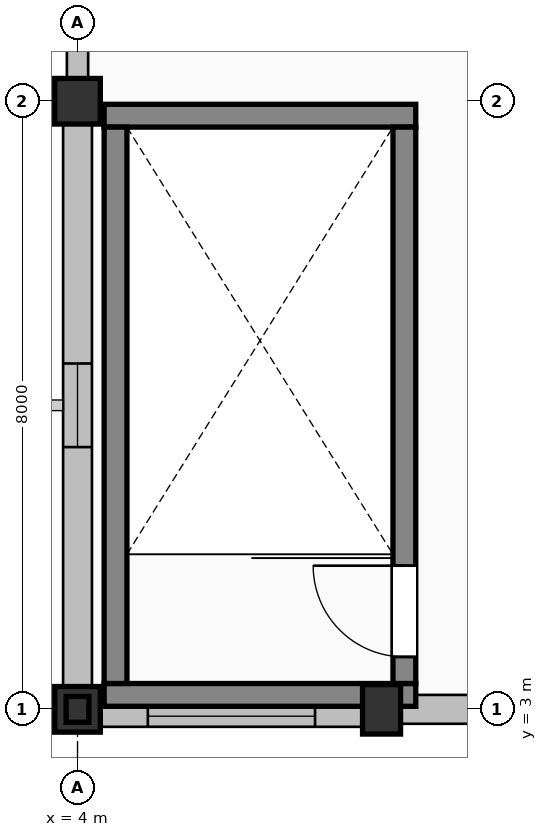
"""IFC4 building model, lengths in metres.
Left out: names, types, materials, properties, quantities, classifications, styles, units other than length and angle.
Written with IfcOpenShell. Run it as: python <this file> out.ifc"""

import sys

from ifc_helpers import new_model, si_unit, direction, frame, frame_2d, origin, origin_2d, place, context, subcontext, project, spatial, rectangle, i_section, extrude, element, fill, save


model = new_model("IFC4")
c1 = context("Model", 3, precision=1e-05, world=origin(), true_north=direction((0.0, 1.0)))
c2 = subcontext(c1, "Body", "Model", "MODEL_VIEW")
j1 = project(units=[si_unit("LENGTHUNIT", "METRE"), si_unit("PLANEANGLEUNIT", "RADIAN")], contexts=[c1])
p1 = place(None, origin())
s1 = spatial("IfcSite", under=j1, at=p1, CompositionType="ELEMENT")
p2 = place(p1, origin())
s2 = spatial("IfcBuilding", under=s1, at=p2, CompositionType="ELEMENT")
p3 = place(p2, frame((0.0, 0.0, 9.3)))
s3 = spatial("IfcBuildingStorey", under=s2, at=p3, CompositionType="ELEMENT", Elevation=9.3)
for number, where, z_axis, x_axis in (
    (1, (4.0, 3.0, 0.0), (0.0, 0.0, 1.0), (1.0, 0.0, 0.0)),
    (2, (4.0, 11.0, 0.0), (0.0, 0.0, 1.0), (1.0, 0.0, 0.0)),
):
    element("IfcColumn", number, at=place(p3, frame(where, z_axis=z_axis, x_axis=x_axis)), inside=s3, PredefinedType="COLUMN", context=c2, shape_type="SweptSolid", body=[
        extrude(rectangle(XDim=0.6, YDim=0.6, at=origin_2d()), origin(), (0.0, 0.0, 1.0), 4.5),
    ])
p4 = place(p3, frame((8.0, 3.0, 0.0), z_axis=(0.0, 0.0, 1.0), x_axis=(1.0, 0.0, 0.0)))
e3 = element("IfcColumn", 3, at=p4, inside=s3, PredefinedType="PILASTER", context=c2, shape_type="SweptSolid", body=[
    extrude(rectangle(XDim=0.5, YDim=0.65, at=origin_2d()), origin(), (0.0, 0.0, 1.0), 4.5),
])
p5 = place(p3, frame((4.0, 3.0, 4.5), z_axis=(0.0, 0.0, 1.0), x_axis=(1.0, 0.0, 0.0)))
e4 = element("IfcColumn", 4, at=p5, inside=s3, PredefinedType="COLUMN", context=c2, shape_type="SweptSolid", body=[
    extrude(i_section(OverallWidth=0.3, OverallDepth=0.34, WebThickness=0.012, FlangeThickness=0.021, FilletRadius=0.027, at=origin_2d()), origin(), (0.0, 0.0, 1.0), 1.566),
])
p6 = place(p3, frame((4.0, 3.3, 0.0), z_axis=(0.0, 0.0, 1.0), x_axis=(0.0, 1.0, 0.0)))
e5 = element("IfcWall", 5, at=p6, inside=s3, PredefinedType="SOLIDWALL", context=c2, shape_type="SweptSolid", body=[
    extrude(rectangle(XDim=7.4, YDim=0.38, at=frame_2d((3.7, 0.0))), origin(), (0.0, 0.0, 1.0), 3.585),
])
p7 = place(p6, frame((3.15, 0.0, 0.95)))
e6 = element("IfcOpeningElement", 6, at=p7, cuts=e5, PredefinedType="OPENING", context=c2, shape_type="SweptSolid", body=[
    extrude(rectangle(XDim=1.1, YDim=2.0, at=frame_2d((0.55, 1.0))), frame((0.0, 0.2, 0.0), z_axis=(0.0, -1.0, 0.0), x_axis=(1.0, 0.0, 0.0)), (0.0, 0.0, 1.0), 0.4),
])
p8 = place(p3, frame((4.0, 11.3, 0.0), z_axis=(0.0, 0.0, 1.0), x_axis=(0.0, 1.0, 0.0)))
e7 = element("IfcWall", 7, at=p8, inside=s3, PredefinedType="SOLIDWALL", context=c2, shape_type="SweptSolid", body=[
    extrude(rectangle(XDim=7.4, YDim=0.28, at=frame_2d((3.7, 0.0))), origin(), (0.0, 0.0, 1.0), 3.585),
])
p9 = place(p8, frame((3.0, 0.0, 0.95)))
e8 = element("IfcOpeningElement", 8, at=p9, cuts=e7, PredefinedType="OPENING", context=c2, shape_type="SweptSolid", body=[
    extrude(rectangle(XDim=1.4, YDim=1.8, at=frame_2d((0.7, 0.9))), frame((0.0, 0.15, 0.0), z_axis=(0.0, -1.0, 0.0), x_axis=(1.0, 0.0, 0.0)), (0.0, 0.0, 1.0), 0.3),
])
p10 = place(p3, frame((11.7, 3.0, 0.0), z_axis=(0.0, 0.0, 1.0), x_axis=(-1.0, 0.0, 0.0)))
e9 = element("IfcWall", 9, at=p10, inside=s3, PredefinedType="SOLIDWALL", context=c2, shape_type="SweptSolid", body=[
    extrude(rectangle(XDim=3.45, YDim=0.38, at=frame_2d((1.725, 0.0))), origin(), (0.0, 0.0, 1.0), 4.125),
])
p11 = place(p10, frame((0.925, 0.0, 0.95)))
e10 = element("IfcOpeningElement", 10, at=p11, cuts=e9, PredefinedType="OPENING", context=c2, shape_type="SweptSolid", body=[
    extrude(rectangle(XDim=1.6, YDim=1.8, at=frame_2d((0.8, 0.9))), frame((0.0, 0.2, 0.0), z_axis=(0.0, -1.0, 0.0), x_axis=(1.0, 0.0, 0.0)), (0.0, 0.0, 1.0), 0.4),
])
p12 = place(p3, frame((7.75, 2.91, 0.0), z_axis=(0.0, 0.0, 1.0), x_axis=(-1.0, 0.0, 0.0)))
e11 = element("IfcWall", 11, at=p12, inside=s3, PredefinedType="SOLIDWALL", context=c2, shape_type="SweptSolid", body=[
    extrude(rectangle(XDim=3.45, YDim=0.28, at=frame_2d((1.725, 0.0))), origin(), (0.0, 0.0, 1.0), 4.125),
])
p13 = place(p12, frame((0.625, 0.0, 0.95)))
e12 = element("IfcOpeningElement", 12, at=p13, cuts=e11, PredefinedType="OPENING", context=c2, shape_type="SweptSolid", body=[
    extrude(rectangle(XDim=2.2, YDim=1.8, at=frame_2d((1.1, 0.9))), frame((0.0, 0.15, 0.0), z_axis=(0.0, -1.0, 0.0), x_axis=(1.0, 0.0, 0.0)), (0.0, 0.0, 1.0), 0.3),
])
for number, where, z_axis, x_axis in (
    (13, (4.35, 3.19, 0.0), (0.0, 0.0, 1.0), (1.0, 0.0, 0.0)),
    (14, (8.45, 10.81, 0.0), (0.0, 0.0, 1.0), (-1.0, 0.0, 0.0)),
):
    element("IfcWall", number, at=place(p3, frame(where, z_axis=z_axis, x_axis=x_axis)), inside=s3, PredefinedType="SHEAR", context=c2, shape_type="SweptSolid", body=[
        extrude(rectangle(XDim=4.1, YDim=0.3, at=frame_2d((2.05, 0.0))), origin(), (0.0, 0.0, 1.0), 4.25),
    ])
p14 = place(p3, frame((4.5, 3.34, 0.0), z_axis=(0.0, 0.0, 1.0), x_axis=(0.0, 1.0, 0.0)))
e15 = element("IfcWall", 15, at=p14, inside=s3, PredefinedType="SHEAR", context=c2, shape_type="SweptSolid", body=[
    extrude(rectangle(XDim=7.32, YDim=0.3, at=frame_2d((3.66, 0.0))), origin(), (0.0, 0.0, 1.0), 4.25),
])
p15 = place(p3, frame((8.3, 3.34, 0.0), z_axis=(0.0, 0.0, 1.0), x_axis=(0.0, 1.0, 0.0)))
e16 = element("IfcWall", 16, at=p15, inside=s3, PredefinedType="SHEAR", context=c2, shape_type="SweptSolid", body=[
    extrude(rectangle(XDim=7.32, YDim=0.3, at=frame_2d((3.66, 0.0))), origin(), (0.0, 0.0, 1.0), 4.25),
])
p16 = place(p15, frame((0.35, 0.0, 0.0)))
e17 = element("IfcOpeningElement", 17, at=p16, cuts=e16, PredefinedType="OPENING", context=c2, shape_type="SweptSolid", body=[
    extrude(rectangle(XDim=1.2, YDim=2.15, at=frame_2d((0.6, 1.075))), frame((0.0, 0.16, 0.0), z_axis=(0.0, -1.0, 0.0), x_axis=(1.0, 0.0, 0.0)), (0.0, 0.0, 1.0), 0.32),
])
p17 = place(p7, origin())
e18 = element("IfcWindow", 18, at=p17, inside=s3, PartitioningType="SINGLE_PANEL", PredefinedType="WINDOW", context=c2, shape_type="SweptSolid", body=[
    extrude(rectangle(XDim=1.1, YDim=2.0, at=frame_2d((0.55, 1.0))), frame((0.0, 0.03, 0.0), z_axis=(0.0, -1.0, 0.0), x_axis=(1.0, 0.0, 0.0)), (0.0, 0.0, 1.0), 0.06),
])
fill(e6, e18)
p18 = place(p13, origin())
e19 = element("IfcWindow", 19, at=p18, inside=s3, PartitioningType="TRIPLE_PANEL_VERTICAL", PredefinedType="WINDOW", context=c2, shape_type="SweptSolid", body=[
    extrude(rectangle(XDim=2.2, YDim=1.8, at=frame_2d((1.1, 0.9))), frame((0.0, 0.03, 0.0), z_axis=(0.0, -1.0, 0.0), x_axis=(1.0, 0.0, 0.0)), (0.0, 0.0, 1.0), 0.06),
])
fill(e12, e19)
p19 = place(p16, origin())
e20 = element("IfcDoor", 20, at=p19, inside=s3, OperationType="SINGLE_SWING_RIGHT", PredefinedType="DOOR", context=c2, shape_type="SweptSolid", body=[
    extrude(rectangle(XDim=1.2, YDim=2.15, at=frame_2d((0.6, 1.075))), frame((0.0, 0.025, 0.0), z_axis=(0.0, -1.0, 0.0), x_axis=(1.0, 0.0, 0.0)), (0.0, 0.0, 1.0), 0.05),
])
fill(e17, e20)
save(model, sys.argv[1])
